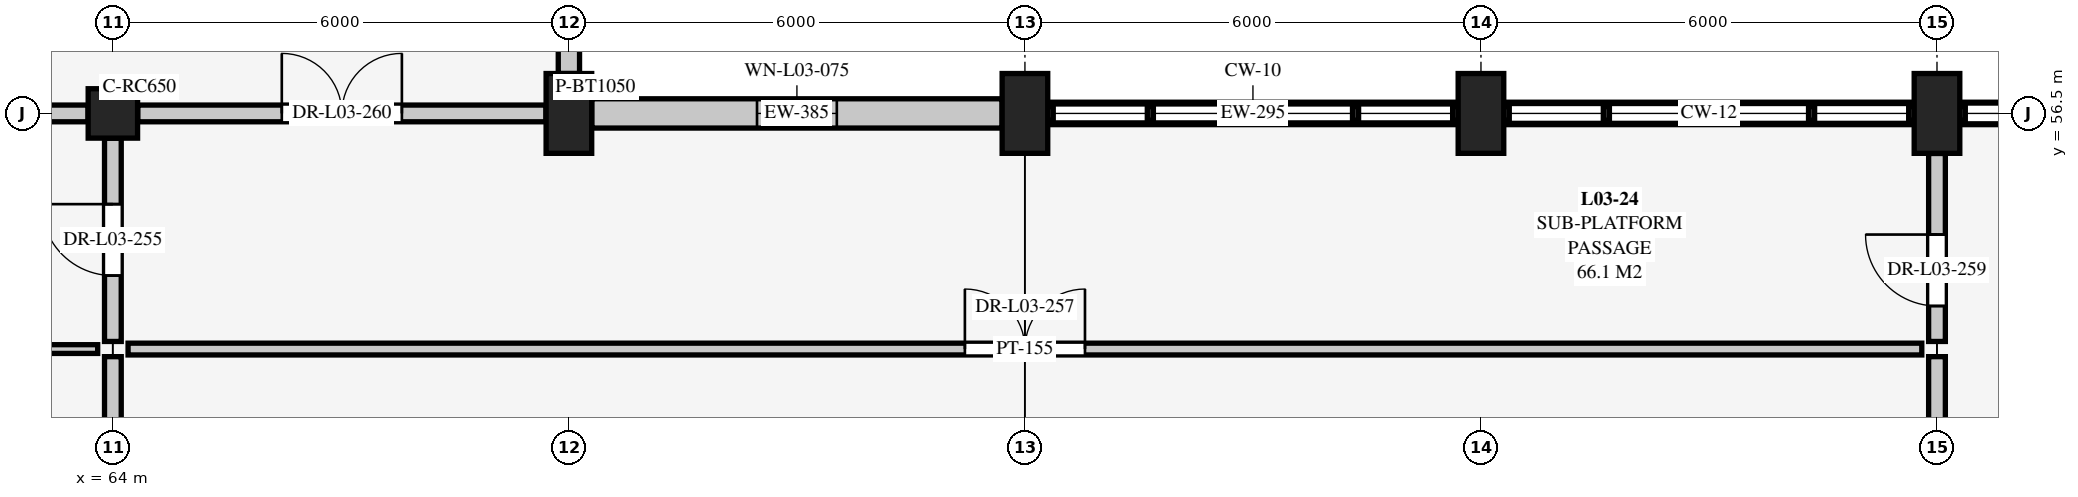
"""IFC4 building model, lengths in metres.
Left out: names, types, materials, properties, quantities, classifications, styles, units other than length and angle.
Written with IfcOpenShell. Run it as: python <this file> out.ifc"""

import sys

from ifc_helpers import new_model, si_unit, direction, frame, frame_2d, origin, origin_2d, place, context, subcontext, project, spatial, rectangle, extrude, element, fill, save


model = new_model("IFC4")
c1 = context("Model", 3, precision=1e-05, world=origin(), true_north=direction((0.0, 1.0)))
c2 = subcontext(c1, "Body", "Model", "MODEL_VIEW")
j1 = project(units=[si_unit("LENGTHUNIT", "METRE"), si_unit("PLANEANGLEUNIT", "RADIAN")], contexts=[c1])
p1 = place(None, origin())
s1 = spatial("IfcSite", under=j1, at=p1, CompositionType="ELEMENT")
p2 = place(p1, origin())
s2 = spatial("IfcBuilding", under=s1, at=p2, CompositionType="ELEMENT")
p3 = place(p2, frame((0.0, 0.0, 9.0)))
s3 = spatial("IfcBuildingStorey", under=s2, at=p3, CompositionType="ELEMENT", Elevation=9.0)
p4 = place(p3, frame((64.0, 56.5, 0.0), z_axis=(0.0, 0.0, 1.0), x_axis=(1.0, 0.0, 0.0)))
e1 = element("IfcColumn", 1, at=p4, inside=s3, PredefinedType="COLUMN", context=c2, shape_type="SweptSolid", body=[
    extrude(rectangle(XDim=0.65, YDim=0.65, at=origin_2d()), origin(), (0.0, 0.0, 1.0), 4.5),
])
for number, where, z_axis, x_axis in (
    (2, (70.0, 56.5, 0.0), (0.0, 0.0, 1.0), (1.0, 0.0, 0.0)),
    (3, (76.0, 56.5, 0.0), (0.0, 0.0, 1.0), (1.0, 0.0, 0.0)),
    (4, (82.0, 56.5, 0.0), (0.0, 0.0, 1.0), (1.0, 0.0, 0.0)),
    (5, (88.0, 56.5, 0.0), (0.0, 0.0, 1.0), (1.0, 0.0, 0.0)),
):
    element("IfcColumn", number, at=place(p3, frame(where, z_axis=z_axis, x_axis=x_axis)), inside=s3, PredefinedType="PILASTER", context=c2, shape_type="SweptSolid", body=[
        extrude(rectangle(XDim=0.6, YDim=1.05, at=origin_2d()), origin(), (0.0, 0.0, 1.0), 4.5),
    ])
p5 = place(p3, frame((70.3, 56.5, 0.0), z_axis=(0.0, 0.0, 1.0), x_axis=(1.0, 0.0, 0.0)))
e6 = element("IfcWall", 6, at=p5, inside=s3, PredefinedType="SOLIDWALL", context=c2, shape_type="SweptSolid", body=[
    extrude(rectangle(XDim=5.4, YDim=0.385, at=frame_2d((2.7, 0.0))), origin(), (0.0, 0.0, 1.0), 3.833),
])
p6 = place(p5, frame((2.175, 0.0, 0.85)))
e7 = element("IfcOpeningElement", 7, at=p6, cuts=e6, PredefinedType="OPENING", context=c2, shape_type="SweptSolid", body=[
    extrude(rectangle(XDim=1.05, YDim=2.05, at=frame_2d((0.525, 1.025))), frame((0.0, 0.202, 0.0), z_axis=(0.0, -1.0, 0.0), x_axis=(1.0, 0.0, 0.0)), (0.0, 0.0, 1.0), 0.405),
])
p7 = place(p3, frame((76.3, 56.5, 0.0), z_axis=(0.0, 0.0, 1.0), x_axis=(1.0, 0.0, 0.0)))
e8 = element("IfcWall", 8, at=p7, inside=s3, PredefinedType="SOLIDWALL", context=c2, shape_type="SweptSolid", body=[
    extrude(rectangle(XDim=5.4, YDim=0.295, at=frame_2d((2.7, 0.0))), origin(), (0.0, 0.0, 1.0), 0.21),
])
p8 = place(p3, frame((82.3, 56.5, 0.0), z_axis=(0.0, 0.0, 1.0), x_axis=(1.0, 0.0, 0.0)))
e9 = element("IfcWall", 9, at=p8, inside=s3, PredefinedType="SOLIDWALL", context=c2, shape_type="SweptSolid", body=[
    extrude(rectangle(XDim=5.4, YDim=0.295, at=frame_2d((2.7, 0.0))), origin(), (0.0, 0.0, 1.0), 0.31),
])
p9 = place(p3, frame((88.3, 56.5, 0.0), z_axis=(0.0, 0.0, 1.0), x_axis=(1.0, 0.0, 0.0)))
e10 = element("IfcWall", 10, at=p9, inside=s3, PredefinedType="SOLIDWALL", context=c2, shape_type="SweptSolid", body=[
    extrude(rectangle(XDim=5.4, YDim=0.295, at=frame_2d((2.7, 0.0))), origin(), (0.0, 0.0, 1.0), 0.41),
])
p10 = place(p3, frame((70.0, 61.25, 0.0), z_axis=(0.0, 0.0, 1.0), x_axis=(0.0, -1.0, 0.0)))
e11 = element("IfcWall", 11, at=p10, inside=s3, PredefinedType="SOLIDWALL", context=c2, shape_type="SweptSolid", body=[
    extrude(rectangle(XDim=4.225, YDim=0.28, at=frame_2d((2.113, 0.0))), origin(), (0.0, 0.0, 1.0), 3.833),
])
p11 = place(p10, frame((1.438, 0.0, 0.8)))
e12 = element("IfcOpeningElement", 12, at=p11, cuts=e11, PredefinedType="OPENING", context=c2, shape_type="SweptSolid", body=[
    extrude(rectangle(XDim=1.35, YDim=2.15, at=frame_2d((0.675, 1.075))), frame((0.0, 0.15, 0.0), z_axis=(0.0, -1.0, 0.0), x_axis=(1.0, 0.0, 0.0)), (0.0, 0.0, 1.0), 0.3),
])
p12 = place(p3, frame((52.2, 53.4, 0.0), z_axis=(0.0, 0.0, 1.0), x_axis=(1.0, 0.0, 0.0)))
e13 = element("IfcWall", 13, at=p12, inside=s3, PredefinedType="PARTITIONING", context=c2, shape_type="SweptSolid", body=[
    extrude(rectangle(XDim=11.6, YDim=0.115, at=frame_2d((5.8, 0.0))), origin(), (0.0, 0.0, 1.0), 4.276),
])
p13 = place(p12, frame((4.68, 0.0, 0.0)))
e14 = element("IfcOpeningElement", 14, at=p13, cuts=e13, PredefinedType="OPENING", context=c2, shape_type="SweptSolid", body=[
    extrude(rectangle(XDim=2.24, YDim=2.4, at=frame_2d((1.12, 1.2))), frame((0.0, 0.068, 0.0), z_axis=(0.0, -1.0, 0.0), x_axis=(1.0, 0.0, 0.0)), (0.0, 0.0, 1.0), 0.135),
])
p14 = place(p3, frame((64.0, 51.252, 0.0), z_axis=(0.0, 0.0, 1.0), x_axis=(0.0, 1.0, 0.0)))
e15 = element("IfcWall", 15, at=p14, inside=s3, PredefinedType="SOLIDWALL", context=c2, shape_type="SweptSolid", body=[
    extrude(rectangle(XDim=2.048, YDim=0.22, at=frame_2d((1.024, 0.0))), origin(), (0.0, 0.0, 1.0), 3.886),
])
p15 = place(p3, frame((64.0, 53.5, 0.0), z_axis=(0.0, 0.0, 1.0), x_axis=(0.0, 1.0, 0.0)))
e16 = element("IfcWall", 16, at=p15, inside=s3, PredefinedType="SOLIDWALL", context=c2, shape_type="SweptSolid", body=[
    extrude(rectangle(XDim=2.673, YDim=0.22, at=frame_2d((1.336, 0.0))), origin(), (0.0, 0.0, 1.0), 3.886),
])
p16 = place(p15, frame((0.866, 0.0, 0.0)))
e17 = element("IfcOpeningElement", 17, at=p16, cuts=e16, PredefinedType="OPENING", context=c2, shape_type="SweptSolid", body=[
    extrude(rectangle(XDim=0.94, YDim=2.1, at=frame_2d((0.47, 1.05))), frame((0.0, 0.12, 0.0), z_axis=(0.0, -1.0, 0.0), x_axis=(1.0, 0.0, 0.0)), (0.0, 0.0, 1.0), 0.24),
])
p17 = place(p3, frame((58.277, 56.5, 0.0), z_axis=(0.0, 0.0, 1.0), x_axis=(1.0, 0.0, 0.0)))
e18 = element("IfcWall", 18, at=p17, inside=s3, PredefinedType="SOLIDWALL", context=c2, shape_type="SweptSolid", body=[
    extrude(rectangle(XDim=5.396, YDim=0.22, at=frame_2d((2.698, 0.0))), origin(), (0.0, 0.0, 1.0), 3.623),
])
p18 = place(p3, frame((64.2, 53.4, 0.0), z_axis=(0.0, 0.0, 1.0), x_axis=(1.0, 0.0, 0.0)))
e19 = element("IfcWall", 19, at=p18, inside=s3, PredefinedType="PARTITIONING", context=c2, shape_type="SweptSolid", body=[
    extrude(rectangle(XDim=23.6, YDim=0.155, at=frame_2d((11.8, 0.0))), origin(), (0.0, 0.0, 1.0), 4.252),
])
p19 = place(p18, frame((11.01, 0.0, 0.0)))
e20 = element("IfcOpeningElement", 20, at=p19, cuts=e19, PredefinedType="OPENING", context=c2, shape_type="SweptSolid", body=[
    extrude(rectangle(XDim=1.58, YDim=2.2, at=frame_2d((0.79, 1.1))), frame((0.0, 0.088, 0.0), z_axis=(0.0, -1.0, 0.0), x_axis=(1.0, 0.0, 0.0)), (0.0, 0.0, 1.0), 0.175),
])
p20 = place(p3, frame((88.0, 51.277, 0.0), z_axis=(0.0, 0.0, 1.0), x_axis=(0.0, 1.0, 0.0)))
e21 = element("IfcWall", 21, at=p20, inside=s3, PredefinedType="SOLIDWALL", context=c2, shape_type="SweptSolid", body=[
    extrude(rectangle(XDim=2.023, YDim=0.22, at=frame_2d((1.011, 0.0))), origin(), (0.0, 0.0, 1.0), 3.795),
])
p21 = place(p3, frame((88.0, 53.5, 0.0), z_axis=(0.0, 0.0, 1.0), x_axis=(0.0, 1.0, 0.0)))
e22 = element("IfcWall", 22, at=p21, inside=s3, PredefinedType="SOLIDWALL", context=c2, shape_type="SweptSolid", body=[
    extrude(rectangle(XDim=2.473, YDim=0.22, at=frame_2d((1.236, 0.0))), origin(), (0.0, 0.0, 1.0), 3.795),
])
p22 = place(p21, frame((0.467, 0.0, 0.0)))
e23 = element("IfcOpeningElement", 23, at=p22, cuts=e22, PredefinedType="OPENING", context=c2, shape_type="SweptSolid", body=[
    extrude(rectangle(XDim=0.94, YDim=2.1, at=frame_2d((0.47, 1.05))), frame((0.0, 0.12, 0.0), z_axis=(0.0, -1.0, 0.0), x_axis=(1.0, 0.0, 0.0)), (0.0, 0.0, 1.0), 0.24),
])
p23 = place(p3, frame((64.327, 56.5, 0.0), z_axis=(0.0, 0.0, 1.0), x_axis=(1.0, 0.0, 0.0)))
e24 = element("IfcWall", 24, at=p23, inside=s3, PredefinedType="SOLIDWALL", context=c2, shape_type="SweptSolid", body=[
    extrude(rectangle(XDim=5.371, YDim=0.22, at=frame_2d((2.686, 0.0))), origin(), (0.0, 0.0, 1.0), 3.623),
])
p24 = place(p23, frame((1.896, 0.0, 0.0)))
e25 = element("IfcOpeningElement", 25, at=p24, cuts=e24, PredefinedType="OPENING", context=c2, shape_type="SweptSolid", body=[
    extrude(rectangle(XDim=1.58, YDim=2.2, at=frame_2d((0.79, 1.1))), frame((0.0, 0.12, 0.0), z_axis=(0.0, -1.0, 0.0), x_axis=(1.0, 0.0, 0.0)), (0.0, 0.0, 1.0), 0.24),
])
p25 = place(p6, origin())
e26 = element("IfcWindow", 26, at=p25, inside=s3, PartitioningType="SINGLE_PANEL", PredefinedType="WINDOW", context=c2, shape_type="SweptSolid", body=[
    extrude(rectangle(XDim=1.05, YDim=2.05, at=frame_2d((0.525, 1.025))), frame((0.0, 0.03, 0.0), z_axis=(0.0, -1.0, 0.0), x_axis=(1.0, 0.0, 0.0)), (0.0, 0.0, 1.0), 0.06),
])
fill(e7, e26)
p26 = place(p16, origin())
e27 = element("IfcDoor", 27, at=p26, inside=s3, OperationType="SINGLE_SWING_RIGHT", PredefinedType="DOOR", context=c2, shape_type="SweptSolid", body=[
    extrude(rectangle(XDim=0.94, YDim=2.1, at=frame_2d((0.47, 1.05))), frame((0.0, 0.025, 0.0), z_axis=(0.0, -1.0, 0.0), x_axis=(1.0, 0.0, 0.0)), (0.0, 0.0, 1.0), 0.05),
])
fill(e17, e27)
p27 = place(p19, origin())
e28 = element("IfcDoor", 28, at=p27, inside=s3, OperationType="DOUBLE_DOOR_SINGLE_SWING", PredefinedType="DOOR", context=c2, shape_type="SweptSolid", body=[
    extrude(rectangle(XDim=1.58, YDim=2.2, at=frame_2d((0.79, 1.1))), frame((0.0, 0.025, 0.0), z_axis=(0.0, -1.0, 0.0), x_axis=(1.0, 0.0, 0.0)), (0.0, 0.0, 1.0), 0.05),
])
fill(e20, e28)
p28 = place(p22, origin())
e29 = element("IfcDoor", 29, at=p28, inside=s3, OperationType="SINGLE_SWING_RIGHT", PredefinedType="DOOR", context=c2, shape_type="SweptSolid", body=[
    extrude(rectangle(XDim=0.94, YDim=2.1, at=frame_2d((0.47, 1.05))), frame((0.0, 0.025, 0.0), z_axis=(0.0, -1.0, 0.0), x_axis=(1.0, 0.0, 0.0)), (0.0, 0.0, 1.0), 0.05),
])
fill(e23, e29)
p29 = place(p24, origin())
e30 = element("IfcDoor", 30, at=p29, inside=s3, OperationType="DOUBLE_DOOR_SINGLE_SWING", PredefinedType="DOOR", context=c2, shape_type="SweptSolid", body=[
    extrude(rectangle(XDim=1.58, YDim=2.2, at=frame_2d((0.79, 1.1))), frame((0.0, 0.025, 0.0), z_axis=(0.0, -1.0, 0.0), x_axis=(1.0, 0.0, 0.0)), (0.0, 0.0, 1.0), 0.05),
])
fill(e25, e30)
save(model, sys.argv[1])
